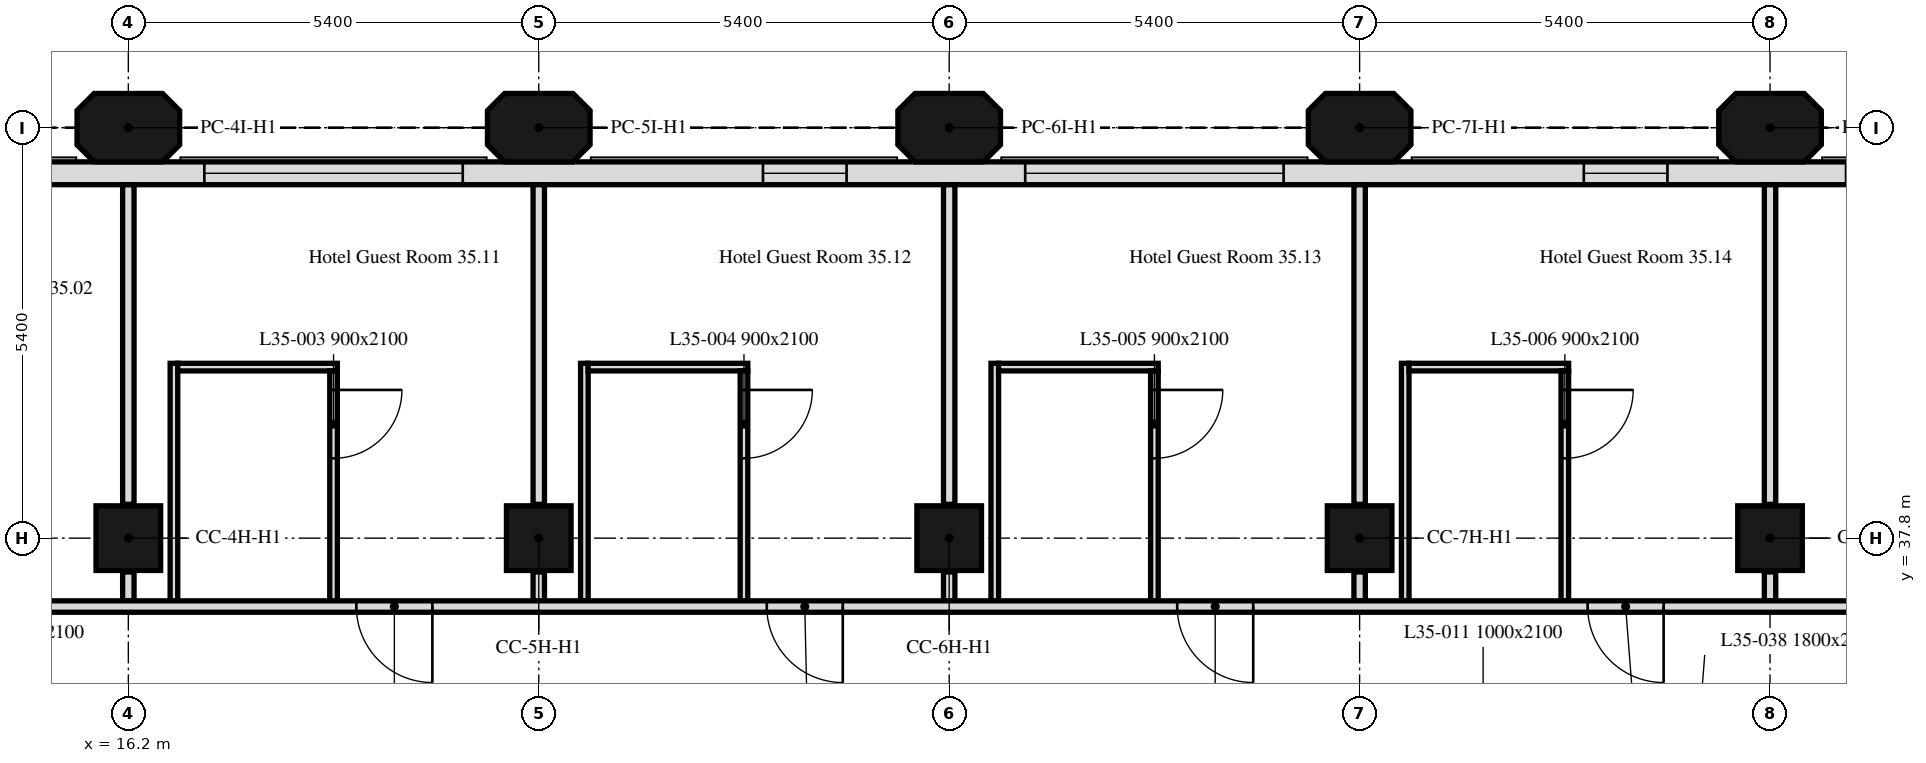
"""IFC4 building model, lengths in metres.
Left out: names, types, materials, properties, quantities, classifications, styles, units other than length and angle.
Written with IfcOpenShell. Run it as: python <this file> out.ifc"""

import sys

from ifc_helpers import new_model, si_unit, direction, frame, frame_2d, origin, origin_2d, place, context, subcontext, project, spatial, polyline, rectangle, outline, extrude, element, fill, save


model = new_model("IFC4")
c1 = context("Model", 3, precision=1e-05, world=origin(), true_north=direction((0.0, 1.0)))
c2 = subcontext(c1, "Body", "Model", "MODEL_VIEW")
j1 = project(units=[si_unit("LENGTHUNIT", "METRE"), si_unit("PLANEANGLEUNIT", "RADIAN")], contexts=[c1])
p1 = place(None, origin())
s1 = spatial("IfcSite", under=j1, at=p1, CompositionType="ELEMENT")
p2 = place(p1, origin())
s2 = spatial("IfcBuilding", under=s1, at=p2, CompositionType="ELEMENT")
p3 = place(p2, frame((0.0, 0.0, 152.8)))
s3 = spatial("IfcBuildingStorey", under=s2, at=p3, CompositionType="ELEMENT", Elevation=152.8)
for number, where, z_axis, x_axis in (
    (1, (16.2, 37.8, 0.0), (0.0, 0.0, 1.0), (1.0, 0.0, 0.0)),
    (2, (21.6, 37.8, 0.0), (0.0, 0.0, 1.0), (1.0, 0.0, 0.0)),
    (3, (27.0, 37.8, 0.0), (0.0, 0.0, 1.0), (1.0, 0.0, 0.0)),
    (4, (32.4, 37.8, 0.0), (0.0, 0.0, 1.0), (1.0, 0.0, 0.0)),
    (5, (37.8, 37.8, 0.0), (0.0, 0.0, 1.0), (1.0, 0.0, 0.0)),
):
    element("IfcColumn", number, at=place(p3, frame(where, z_axis=z_axis, x_axis=x_axis)), inside=s3, PredefinedType="COLUMN", context=c2, shape_type="SweptSolid", body=[
        extrude(rectangle(XDim=0.85, YDim=0.85, at=origin_2d()), origin(), (0.0, 0.0, 1.0), 3.0),
    ])
for number, where, z_axis, x_axis in (
    (6, (16.2, 43.2, 0.0), (0.0, 0.0, 1.0), (1.0, 0.0, 0.0)),
    (7, (21.6, 43.2, 0.0), (0.0, 0.0, 1.0), (1.0, 0.0, 0.0)),
    (8, (27.0, 43.2, 0.0), (0.0, 0.0, 1.0), (1.0, 0.0, 0.0)),
    (9, (32.4, 43.2, 0.0), (0.0, 0.0, 1.0), (1.0, 0.0, 0.0)),
    (10, (37.8, 43.2, 0.0), (0.0, 0.0, 1.0), (1.0, 0.0, 0.0)),
):
    element("IfcColumn", number, at=place(p3, frame(where, z_axis=z_axis, x_axis=x_axis)), inside=s3, PredefinedType="COLUMN", context=c2, shape_type="SweptSolid", body=[
        extrude(outline(polyline([(-0.45, -0.45), (0.45, -0.45), (0.675, -0.225), (0.675, 0.225), (0.45, 0.45), (-0.45, 0.45), (-0.675, 0.225), (-0.675, -0.225), (-0.45, -0.45)])), origin(), (0.0, 0.0, 1.0), 3.0),
    ])
p4 = place(p3, frame((43.014, 42.6, 0.0), z_axis=(0.0, 0.0, 1.0), x_axis=(-1.0, 0.0, 0.0)))
e11 = element("IfcWall", 11, at=p4, inside=s3, PredefinedType="SOLIDWALL", context=c2, shape_type="SweptSolid", body=[
    extrude(rectangle(XDim=32.027, YDim=0.3, at=frame_2d((16.014, 0.0))), origin(), (0.0, 0.0, 1.0), 3.0),
])
p5 = place(p4, frame((0.814, 0.0, 0.9)))
e12 = element("IfcOpeningElement", 12, at=p5, cuts=e11, PredefinedType="OPENING", context=c2, shape_type="SweptSolid", body=[
    extrude(rectangle(XDim=3.4, YDim=1.7, at=frame_2d((1.7, 0.85))), frame((0.0, 0.16, 0.0), z_axis=(0.0, -1.0, 0.0), x_axis=(1.0, 0.0, 0.0)), (0.0, 0.0, 1.0), 0.32),
])
p6 = place(p4, frame((6.564, 0.0, 0.9)))
e13 = element("IfcOpeningElement", 13, at=p6, cuts=e11, PredefinedType="OPENING", context=c2, shape_type="SweptSolid", body=[
    extrude(rectangle(XDim=1.1, YDim=1.7, at=frame_2d((0.55, 0.85))), frame((0.0, 0.16, 0.0), z_axis=(0.0, -1.0, 0.0), x_axis=(1.0, 0.0, 0.0)), (0.0, 0.0, 1.0), 0.32),
])
p7 = place(p4, frame((11.614, 0.0, 0.9)))
e14 = element("IfcOpeningElement", 14, at=p7, cuts=e11, PredefinedType="OPENING", context=c2, shape_type="SweptSolid", body=[
    extrude(rectangle(XDim=3.4, YDim=1.7, at=frame_2d((1.7, 0.85))), frame((0.0, 0.16, 0.0), z_axis=(0.0, -1.0, 0.0), x_axis=(1.0, 0.0, 0.0)), (0.0, 0.0, 1.0), 0.32),
])
p8 = place(p4, frame((17.364, 0.0, 0.9)))
e15 = element("IfcOpeningElement", 15, at=p8, cuts=e11, PredefinedType="OPENING", context=c2, shape_type="SweptSolid", body=[
    extrude(rectangle(XDim=1.1, YDim=1.7, at=frame_2d((0.55, 0.85))), frame((0.0, 0.16, 0.0), z_axis=(0.0, -1.0, 0.0), x_axis=(1.0, 0.0, 0.0)), (0.0, 0.0, 1.0), 0.32),
])
p9 = place(p4, frame((22.414, 0.0, 0.9)))
e16 = element("IfcOpeningElement", 16, at=p9, cuts=e11, PredefinedType="OPENING", context=c2, shape_type="SweptSolid", body=[
    extrude(rectangle(XDim=3.4, YDim=1.7, at=frame_2d((1.7, 0.85))), frame((0.0, 0.16, 0.0), z_axis=(0.0, -1.0, 0.0), x_axis=(1.0, 0.0, 0.0)), (0.0, 0.0, 1.0), 0.32),
])
p10 = place(p4, frame((28.164, 0.0, 0.9)))
e17 = element("IfcOpeningElement", 17, at=p10, cuts=e11, PredefinedType="OPENING", context=c2, shape_type="SweptSolid", body=[
    extrude(rectangle(XDim=1.1, YDim=1.7, at=frame_2d((0.55, 0.85))), frame((0.0, 0.16, 0.0), z_axis=(0.0, -1.0, 0.0), x_axis=(1.0, 0.0, 0.0)), (0.0, 0.0, 1.0), 0.32),
])
p11 = place(p3, frame((16.2, 36.975, 0.0), z_axis=(0.0, 0.0, 1.0), x_axis=(0.0, 1.0, 0.0)))
e18 = element("IfcWall", 18, at=p11, inside=s3, PredefinedType="PARTITIONING", context=c2, shape_type="SweptSolid", body=[
    extrude(rectangle(XDim=0.38, YDim=0.15, at=frame_2d((0.19, 0.0))), origin(), (0.0, 0.0, 1.0), 3.0),
])
p12 = place(p3, frame((16.2, 38.245, 0.0), z_axis=(0.0, 0.0, 1.0), x_axis=(0.0, 1.0, 0.0)))
e19 = element("IfcWall", 19, at=p12, inside=s3, PredefinedType="PARTITIONING", context=c2, shape_type="SweptSolid", body=[
    extrude(rectangle(XDim=4.204, YDim=0.15, at=frame_2d((2.102, 0.0))), origin(), (0.0, 0.0, 1.0), 3.0),
])
p13 = place(p3, frame((16.8, 36.975, 0.0), z_axis=(0.0, 0.0, 1.0), x_axis=(0.0, 1.0, 0.0)))
e20 = element("IfcWall", 20, at=p13, inside=s3, PredefinedType="PARTITIONING", context=c2, shape_type="SweptSolid", body=[
    extrude(rectangle(XDim=3.125, YDim=0.1, at=frame_2d((1.562, 0.0))), origin(), (0.0, 0.0, 1.0), 3.0),
])
p14 = place(p3, frame((16.85, 40.05, 0.0), z_axis=(0.0, 0.0, 1.0), x_axis=(1.0, 0.0, 0.0)))
e21 = element("IfcWall", 21, at=p14, inside=s3, PredefinedType="PARTITIONING", context=c2, shape_type="SweptSolid", body=[
    extrude(rectangle(XDim=2.1, YDim=0.1, at=frame_2d((1.05, 0.0))), origin(), (0.0, 0.0, 1.0), 3.0),
])
p15 = place(p3, frame((18.9, 40.0, 0.0), z_axis=(0.0, 0.0, 1.0), x_axis=(0.0, -1.0, 0.0)))
e22 = element("IfcWall", 22, at=p15, inside=s3, PredefinedType="PARTITIONING", context=c2, shape_type="SweptSolid", body=[
    extrude(rectangle(XDim=3.025, YDim=0.1, at=frame_2d((1.512, 0.0))), origin(), (0.0, 0.0, 1.0), 3.0),
])
p16 = place(p15, frame((0.25, 0.0, 0.0)))
e23 = element("IfcOpeningElement", 23, at=p16, cuts=e22, PredefinedType="OPENING", context=c2, shape_type="SweptSolid", body=[
    extrude(rectangle(XDim=0.9, YDim=2.1, at=frame_2d((0.45, 1.05))), frame((0.0, 0.05, 0.0), z_axis=(0.0, -1.0, 0.0), x_axis=(1.0, 0.0, 0.0)), (0.0, 0.0, 1.0), 0.1),
])
p17 = place(p3, frame((21.6, 36.975, 0.0), z_axis=(0.0, 0.0, 1.0), x_axis=(0.0, 1.0, 0.0)))
e24 = element("IfcWall", 24, at=p17, inside=s3, PredefinedType="PARTITIONING", context=c2, shape_type="SweptSolid", body=[
    extrude(rectangle(XDim=0.38, YDim=0.15, at=frame_2d((0.19, 0.0))), origin(), (0.0, 0.0, 1.0), 3.0),
])
p18 = place(p3, frame((21.6, 38.245, 0.0), z_axis=(0.0, 0.0, 1.0), x_axis=(0.0, 1.0, 0.0)))
e25 = element("IfcWall", 25, at=p18, inside=s3, PredefinedType="PARTITIONING", context=c2, shape_type="SweptSolid", body=[
    extrude(rectangle(XDim=4.204, YDim=0.15, at=frame_2d((2.102, 0.0))), origin(), (0.0, 0.0, 1.0), 3.0),
])
p19 = place(p3, frame((22.2, 36.975, 0.0), z_axis=(0.0, 0.0, 1.0), x_axis=(0.0, 1.0, 0.0)))
e26 = element("IfcWall", 26, at=p19, inside=s3, PredefinedType="PARTITIONING", context=c2, shape_type="SweptSolid", body=[
    extrude(rectangle(XDim=3.125, YDim=0.1, at=frame_2d((1.562, 0.0))), origin(), (0.0, 0.0, 1.0), 3.0),
])
p20 = place(p3, frame((22.25, 40.05, 0.0), z_axis=(0.0, 0.0, 1.0), x_axis=(1.0, 0.0, 0.0)))
e27 = element("IfcWall", 27, at=p20, inside=s3, PredefinedType="PARTITIONING", context=c2, shape_type="SweptSolid", body=[
    extrude(rectangle(XDim=2.1, YDim=0.1, at=frame_2d((1.05, 0.0))), origin(), (0.0, 0.0, 1.0), 3.0),
])
p21 = place(p3, frame((24.3, 40.0, 0.0), z_axis=(0.0, 0.0, 1.0), x_axis=(0.0, -1.0, 0.0)))
e28 = element("IfcWall", 28, at=p21, inside=s3, PredefinedType="PARTITIONING", context=c2, shape_type="SweptSolid", body=[
    extrude(rectangle(XDim=3.025, YDim=0.1, at=frame_2d((1.512, 0.0))), origin(), (0.0, 0.0, 1.0), 3.0),
])
p22 = place(p21, frame((0.25, 0.0, 0.0)))
e29 = element("IfcOpeningElement", 29, at=p22, cuts=e28, PredefinedType="OPENING", context=c2, shape_type="SweptSolid", body=[
    extrude(rectangle(XDim=0.9, YDim=2.1, at=frame_2d((0.45, 1.05))), frame((0.0, 0.05, 0.0), z_axis=(0.0, -1.0, 0.0), x_axis=(1.0, 0.0, 0.0)), (0.0, 0.0, 1.0), 0.1),
])
p23 = place(p3, frame((27.0, 36.975, 0.0), z_axis=(0.0, 0.0, 1.0), x_axis=(0.0, 1.0, 0.0)))
e30 = element("IfcWall", 30, at=p23, inside=s3, PredefinedType="PARTITIONING", context=c2, shape_type="SweptSolid", body=[
    extrude(rectangle(XDim=0.38, YDim=0.15, at=frame_2d((0.19, 0.0))), origin(), (0.0, 0.0, 1.0), 3.0),
])
p24 = place(p3, frame((27.0, 38.245, 0.0), z_axis=(0.0, 0.0, 1.0), x_axis=(0.0, 1.0, 0.0)))
e31 = element("IfcWall", 31, at=p24, inside=s3, PredefinedType="PARTITIONING", context=c2, shape_type="SweptSolid", body=[
    extrude(rectangle(XDim=4.204, YDim=0.15, at=frame_2d((2.102, 0.0))), origin(), (0.0, 0.0, 1.0), 3.0),
])
p25 = place(p3, frame((27.6, 36.975, 0.0), z_axis=(0.0, 0.0, 1.0), x_axis=(0.0, 1.0, 0.0)))
e32 = element("IfcWall", 32, at=p25, inside=s3, PredefinedType="PARTITIONING", context=c2, shape_type="SweptSolid", body=[
    extrude(rectangle(XDim=3.125, YDim=0.1, at=frame_2d((1.562, 0.0))), origin(), (0.0, 0.0, 1.0), 3.0),
])
p26 = place(p3, frame((27.65, 40.05, 0.0), z_axis=(0.0, 0.0, 1.0), x_axis=(1.0, 0.0, 0.0)))
e33 = element("IfcWall", 33, at=p26, inside=s3, PredefinedType="PARTITIONING", context=c2, shape_type="SweptSolid", body=[
    extrude(rectangle(XDim=2.1, YDim=0.1, at=frame_2d((1.05, 0.0))), origin(), (0.0, 0.0, 1.0), 3.0),
])
p27 = place(p3, frame((29.7, 40.0, 0.0), z_axis=(0.0, 0.0, 1.0), x_axis=(0.0, -1.0, 0.0)))
e34 = element("IfcWall", 34, at=p27, inside=s3, PredefinedType="PARTITIONING", context=c2, shape_type="SweptSolid", body=[
    extrude(rectangle(XDim=3.025, YDim=0.1, at=frame_2d((1.512, 0.0))), origin(), (0.0, 0.0, 1.0), 3.0),
])
p28 = place(p27, frame((0.25, 0.0, 0.0)))
e35 = element("IfcOpeningElement", 35, at=p28, cuts=e34, PredefinedType="OPENING", context=c2, shape_type="SweptSolid", body=[
    extrude(rectangle(XDim=0.9, YDim=2.1, at=frame_2d((0.45, 1.05))), frame((0.0, 0.05, 0.0), z_axis=(0.0, -1.0, 0.0), x_axis=(1.0, 0.0, 0.0)), (0.0, 0.0, 1.0), 0.1),
])
p29 = place(p3, frame((32.4, 36.975, 0.0), z_axis=(0.0, 0.0, 1.0), x_axis=(0.0, 1.0, 0.0)))
e36 = element("IfcWall", 36, at=p29, inside=s3, PredefinedType="PARTITIONING", context=c2, shape_type="SweptSolid", body=[
    extrude(rectangle(XDim=0.38, YDim=0.15, at=frame_2d((0.19, 0.0))), origin(), (0.0, 0.0, 1.0), 3.0),
])
p30 = place(p3, frame((32.4, 38.245, 0.0), z_axis=(0.0, 0.0, 1.0), x_axis=(0.0, 1.0, 0.0)))
e37 = element("IfcWall", 37, at=p30, inside=s3, PredefinedType="PARTITIONING", context=c2, shape_type="SweptSolid", body=[
    extrude(rectangle(XDim=4.204, YDim=0.15, at=frame_2d((2.102, 0.0))), origin(), (0.0, 0.0, 1.0), 3.0),
])
p31 = place(p3, frame((33.0, 36.975, 0.0), z_axis=(0.0, 0.0, 1.0), x_axis=(0.0, 1.0, 0.0)))
e38 = element("IfcWall", 38, at=p31, inside=s3, PredefinedType="PARTITIONING", context=c2, shape_type="SweptSolid", body=[
    extrude(rectangle(XDim=3.125, YDim=0.1, at=frame_2d((1.562, 0.0))), origin(), (0.0, 0.0, 1.0), 3.0),
])
p32 = place(p3, frame((33.05, 40.05, 0.0), z_axis=(0.0, 0.0, 1.0), x_axis=(1.0, 0.0, 0.0)))
e39 = element("IfcWall", 39, at=p32, inside=s3, PredefinedType="PARTITIONING", context=c2, shape_type="SweptSolid", body=[
    extrude(rectangle(XDim=2.1, YDim=0.1, at=frame_2d((1.05, 0.0))), origin(), (0.0, 0.0, 1.0), 3.0),
])
p33 = place(p3, frame((35.1, 40.0, 0.0), z_axis=(0.0, 0.0, 1.0), x_axis=(0.0, -1.0, 0.0)))
e40 = element("IfcWall", 40, at=p33, inside=s3, PredefinedType="PARTITIONING", context=c2, shape_type="SweptSolid", body=[
    extrude(rectangle(XDim=3.025, YDim=0.1, at=frame_2d((1.512, 0.0))), origin(), (0.0, 0.0, 1.0), 3.0),
])
p34 = place(p33, frame((0.25, 0.0, 0.0)))
e41 = element("IfcOpeningElement", 41, at=p34, cuts=e40, PredefinedType="OPENING", context=c2, shape_type="SweptSolid", body=[
    extrude(rectangle(XDim=0.9, YDim=2.1, at=frame_2d((0.45, 1.05))), frame((0.0, 0.05, 0.0), z_axis=(0.0, -1.0, 0.0), x_axis=(1.0, 0.0, 0.0)), (0.0, 0.0, 1.0), 0.1),
])
p35 = place(p3, frame((37.8, 36.975, 0.0), z_axis=(0.0, 0.0, 1.0), x_axis=(0.0, 1.0, 0.0)))
e42 = element("IfcWall", 42, at=p35, inside=s3, PredefinedType="PARTITIONING", context=c2, shape_type="SweptSolid", body=[
    extrude(rectangle(XDim=0.38, YDim=0.15, at=frame_2d((0.19, 0.0))), origin(), (0.0, 0.0, 1.0), 3.0),
])
p36 = place(p3, frame((37.8, 38.245, 0.0), z_axis=(0.0, 0.0, 1.0), x_axis=(0.0, 1.0, 0.0)))
e43 = element("IfcWall", 43, at=p36, inside=s3, PredefinedType="PARTITIONING", context=c2, shape_type="SweptSolid", body=[
    extrude(rectangle(XDim=4.204, YDim=0.15, at=frame_2d((2.102, 0.0))), origin(), (0.0, 0.0, 1.0), 3.0),
])
p37 = place(p3, frame((47.849, 36.9, 0.0), z_axis=(0.0, 0.0, 1.0), x_axis=(-1.0, 0.0, 0.0)))
e44 = element("IfcWall", 44, at=p37, inside=s3, PredefinedType="PARTITIONING", context=c2, shape_type="SweptSolid", body=[
    extrude(rectangle(XDim=41.698, YDim=0.15, at=frame_2d((20.849, 0.0))), origin(), (0.0, 0.0, 1.0), 3.0),
])
p38 = place(p37, frame((27.649, 0.0, 0.0)))
e45 = element("IfcOpeningElement", 45, at=p38, cuts=e44, PredefinedType="OPENING", context=c2, shape_type="SweptSolid", body=[
    extrude(rectangle(XDim=1.0, YDim=2.1, at=frame_2d((0.5, 1.05))), frame((0.0, 0.075, 0.0), z_axis=(0.0, -1.0, 0.0), x_axis=(1.0, 0.0, 0.0)), (0.0, 0.0, 1.0), 0.15),
])
p39 = place(p37, frame((22.249, 0.0, 0.0)))
e46 = element("IfcOpeningElement", 46, at=p39, cuts=e44, PredefinedType="OPENING", context=c2, shape_type="SweptSolid", body=[
    extrude(rectangle(XDim=1.0, YDim=2.1, at=frame_2d((0.5, 1.05))), frame((0.0, 0.075, 0.0), z_axis=(0.0, -1.0, 0.0), x_axis=(1.0, 0.0, 0.0)), (0.0, 0.0, 1.0), 0.15),
])
p40 = place(p37, frame((16.849, 0.0, 0.0)))
e47 = element("IfcOpeningElement", 47, at=p40, cuts=e44, PredefinedType="OPENING", context=c2, shape_type="SweptSolid", body=[
    extrude(rectangle(XDim=1.0, YDim=2.1, at=frame_2d((0.5, 1.05))), frame((0.0, 0.075, 0.0), z_axis=(0.0, -1.0, 0.0), x_axis=(1.0, 0.0, 0.0)), (0.0, 0.0, 1.0), 0.15),
])
p41 = place(p37, frame((11.449, 0.0, 0.0)))
e48 = element("IfcOpeningElement", 48, at=p41, cuts=e44, PredefinedType="OPENING", context=c2, shape_type="SweptSolid", body=[
    extrude(rectangle(XDim=1.0, YDim=2.1, at=frame_2d((0.5, 1.05))), frame((0.0, 0.075, 0.0), z_axis=(0.0, -1.0, 0.0), x_axis=(1.0, 0.0, 0.0)), (0.0, 0.0, 1.0), 0.15),
])
p42 = place(p37, frame((2.744, 0.0, 0.0)))
e49 = element("IfcOpeningElement", 49, at=p42, cuts=e44, PredefinedType="OPENING", context=c2, shape_type="SweptSolid", body=[
    extrude(rectangle(XDim=1.0, YDim=2.1, at=frame_2d((0.5, 1.05))), frame((0.0, 0.075, 0.0), z_axis=(0.0, -1.0, 0.0), x_axis=(1.0, 0.0, 0.0)), (0.0, 0.0, 1.0), 0.15),
])
p43 = place(p37, frame((39.249, 0.0, 0.0)))
e50 = element("IfcOpeningElement", 50, at=p43, cuts=e44, PredefinedType="OPENING", context=c2, shape_type="SweptSolid", body=[
    extrude(rectangle(XDim=1.0, YDim=2.1, at=frame_2d((0.5, 1.05))), frame((0.0, 0.075, 0.0), z_axis=(0.0, -1.0, 0.0), x_axis=(1.0, 0.0, 0.0)), (0.0, 0.0, 1.0), 0.15),
])
p44 = place(p6, origin())
e51 = element("IfcWindow", 51, at=p44, inside=s3, PartitioningType="SINGLE_PANEL", PredefinedType="WINDOW", context=c2, shape_type="SweptSolid", body=[
    extrude(rectangle(XDim=1.1, YDim=1.7, at=frame_2d((0.55, 0.85))), frame((0.0, 0.03, 0.0), z_axis=(0.0, -1.0, 0.0), x_axis=(1.0, 0.0, 0.0)), (0.0, 0.0, 1.0), 0.06),
])
fill(e13, e51)
p45 = place(p7, origin())
e52 = element("IfcWindow", 52, at=p45, inside=s3, PartitioningType="SINGLE_PANEL", PredefinedType="WINDOW", context=c2, shape_type="SweptSolid", body=[
    extrude(rectangle(XDim=3.4, YDim=1.7, at=frame_2d((1.7, 0.85))), frame((0.0, 0.03, 0.0), z_axis=(0.0, -1.0, 0.0), x_axis=(1.0, 0.0, 0.0)), (0.0, 0.0, 1.0), 0.06),
])
fill(e14, e52)
p46 = place(p8, origin())
e53 = element("IfcWindow", 53, at=p46, inside=s3, PartitioningType="SINGLE_PANEL", PredefinedType="WINDOW", context=c2, shape_type="SweptSolid", body=[
    extrude(rectangle(XDim=1.1, YDim=1.7, at=frame_2d((0.55, 0.85))), frame((0.0, 0.03, 0.0), z_axis=(0.0, -1.0, 0.0), x_axis=(1.0, 0.0, 0.0)), (0.0, 0.0, 1.0), 0.06),
])
fill(e15, e53)
p47 = place(p9, origin())
e54 = element("IfcWindow", 54, at=p47, inside=s3, PartitioningType="SINGLE_PANEL", PredefinedType="WINDOW", context=c2, shape_type="SweptSolid", body=[
    extrude(rectangle(XDim=3.4, YDim=1.7, at=frame_2d((1.7, 0.85))), frame((0.0, 0.03, 0.0), z_axis=(0.0, -1.0, 0.0), x_axis=(1.0, 0.0, 0.0)), (0.0, 0.0, 1.0), 0.06),
])
fill(e16, e54)
p48 = place(p16, origin())
e55 = element("IfcDoor", 55, at=p48, inside=s3, OperationType="SINGLE_SWING_LEFT", PredefinedType="DOOR", context=c2, shape_type="SweptSolid", body=[
    extrude(rectangle(XDim=0.9, YDim=2.1, at=frame_2d((0.45, 1.05))), frame((0.0, 0.025, 0.0), z_axis=(0.0, -1.0, 0.0), x_axis=(1.0, 0.0, 0.0)), (0.0, 0.0, 1.0), 0.05),
])
fill(e23, e55)
p49 = place(p22, origin())
e56 = element("IfcDoor", 56, at=p49, inside=s3, OperationType="SINGLE_SWING_RIGHT", PredefinedType="DOOR", context=c2, shape_type="SweptSolid", body=[
    extrude(rectangle(XDim=0.9, YDim=2.1, at=frame_2d((0.45, 1.05))), frame((0.0, 0.025, 0.0), z_axis=(0.0, -1.0, 0.0), x_axis=(1.0, 0.0, 0.0)), (0.0, 0.0, 1.0), 0.05),
])
fill(e29, e56)
p50 = place(p28, origin())
e57 = element("IfcDoor", 57, at=p50, inside=s3, OperationType="SINGLE_SWING_RIGHT", PredefinedType="DOOR", context=c2, shape_type="SweptSolid", body=[
    extrude(rectangle(XDim=0.9, YDim=2.1, at=frame_2d((0.45, 1.05))), frame((0.0, 0.025, 0.0), z_axis=(0.0, -1.0, 0.0), x_axis=(1.0, 0.0, 0.0)), (0.0, 0.0, 1.0), 0.05),
])
fill(e35, e57)
p51 = place(p34, origin())
e58 = element("IfcDoor", 58, at=p51, inside=s3, OperationType="SINGLE_SWING_LEFT", PredefinedType="DOOR", context=c2, shape_type="SweptSolid", body=[
    extrude(rectangle(XDim=0.9, YDim=2.1, at=frame_2d((0.45, 1.05))), frame((0.0, 0.025, 0.0), z_axis=(0.0, -1.0, 0.0), x_axis=(1.0, 0.0, 0.0)), (0.0, 0.0, 1.0), 0.05),
])
fill(e41, e58)
p52 = place(p38, origin())
e59 = element("IfcDoor", 59, at=p52, inside=s3, OperationType="SINGLE_SWING_RIGHT", PredefinedType="DOOR", context=c2, shape_type="SweptSolid", body=[
    extrude(rectangle(XDim=1.0, YDim=2.1, at=frame_2d((0.5, 1.05))), frame((0.0, 0.025, 0.0), z_axis=(0.0, -1.0, 0.0), x_axis=(1.0, 0.0, 0.0)), (0.0, 0.0, 1.0), 0.05),
])
fill(e45, e59)
p53 = place(p39, origin())
e60 = element("IfcDoor", 60, at=p53, inside=s3, OperationType="SINGLE_SWING_RIGHT", PredefinedType="DOOR", context=c2, shape_type="SweptSolid", body=[
    extrude(rectangle(XDim=1.0, YDim=2.1, at=frame_2d((0.5, 1.05))), frame((0.0, 0.025, 0.0), z_axis=(0.0, -1.0, 0.0), x_axis=(1.0, 0.0, 0.0)), (0.0, 0.0, 1.0), 0.05),
])
fill(e46, e60)
p54 = place(p40, origin())
e61 = element("IfcDoor", 61, at=p54, inside=s3, OperationType="SINGLE_SWING_LEFT", PredefinedType="DOOR", context=c2, shape_type="SweptSolid", body=[
    extrude(rectangle(XDim=1.0, YDim=2.1, at=frame_2d((0.5, 1.05))), frame((0.0, 0.025, 0.0), z_axis=(0.0, -1.0, 0.0), x_axis=(1.0, 0.0, 0.0)), (0.0, 0.0, 1.0), 0.05),
])
fill(e47, e61)
p55 = place(p41, origin())
e62 = element("IfcDoor", 62, at=p55, inside=s3, OperationType="SINGLE_SWING_LEFT", PredefinedType="DOOR", context=c2, shape_type="SweptSolid", body=[
    extrude(rectangle(XDim=1.0, YDim=2.1, at=frame_2d((0.5, 1.05))), frame((0.0, 0.025, 0.0), z_axis=(0.0, -1.0, 0.0), x_axis=(1.0, 0.0, 0.0)), (0.0, 0.0, 1.0), 0.05),
])
fill(e48, e62)
save(model, sys.argv[1])
